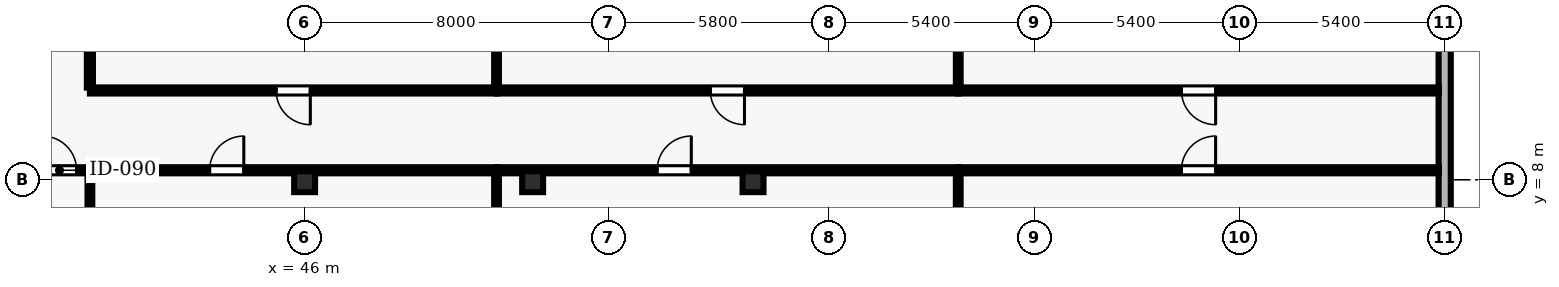
"""IFC4 building model, lengths in metres.
Left out: names, types, materials, properties, quantities, classifications, styles, units other than length and angle.
Written with IfcOpenShell. Run it as: python <this file> out.ifc"""

import sys

from ifc_helpers import new_model, si_unit, direction, frame, frame_2d, origin, origin_2d, place, context, subcontext, project, spatial, rectangle, hollow_rectangle, extrude, element, fill, save


model = new_model("IFC4")
c1 = context("Model", 3, precision=1e-05, world=origin(), true_north=direction((0.0, 1.0)))
c2 = subcontext(c1, "Body", "Model", "MODEL_VIEW")
j1 = project(units=[si_unit("LENGTHUNIT", "METRE"), si_unit("PLANEANGLEUNIT", "RADIAN")], contexts=[c1])
p1 = place(None, origin())
s1 = spatial("IfcSite", under=j1, at=p1, CompositionType="ELEMENT")
p2 = place(p1, origin())
s2 = spatial("IfcBuilding", under=s1, at=p2, CompositionType="ELEMENT")
p3 = place(p2, frame((0.0, 0.0, 81.7)))
s3 = spatial("IfcBuildingStorey", under=s2, at=p3, CompositionType="ELEMENT", Elevation=81.7)
for number, where, z_axis, x_axis in (
    (1, (46.0, 7.95, 0.0), (0.0, 0.0, 1.0), (1.0, 0.0, 0.0)),
    (2, (52.0, 7.95, 0.0), (0.0, 0.0, 1.0), (1.0, 0.0, 0.0)),
    (3, (57.8, 7.95, 0.0), (0.0, 0.0, 1.0), (1.0, 0.0, 0.0)),
):
    element("IfcColumn", number, at=place(p3, frame(where, z_axis=z_axis, x_axis=x_axis)), inside=s3, PredefinedType="COLUMN", context=c2, shape_type="SweptSolid", body=[
        extrude(hollow_rectangle(XDim=0.55, YDim=0.55, WallThickness=0.025, at=origin_2d()), origin(), (0.0, 0.0, 1.0), 3.9),
    ])
p4 = place(p3, frame((76.0, 2.5, 0.0), z_axis=(0.0, 0.0, 1.0), x_axis=(0.0, 1.0, 0.0)))
e4 = element("IfcWall", 4, at=p4, inside=s3, PredefinedType="SOLIDWALL", context=c2, shape_type="SweptSolid", body=[
    extrude(rectangle(XDim=11.0, YDim=0.32, at=frame_2d((5.5, 0.0))), origin(), (0.0, 0.0, 1.0), 3.69),
])
p5 = place(p4, frame((1.85, 0.0, 0.9)))
e5 = element("IfcOpeningElement", 5, at=p5, cuts=e4, PredefinedType="OPENING", context=c2, shape_type="SweptSolid", body=[
    extrude(rectangle(XDim=1.8, YDim=2.2, at=frame_2d((0.9, 1.1))), frame((0.0, 0.17, 0.0), z_axis=(0.0, -1.0, 0.0), x_axis=(1.0, 0.0, 0.0)), (0.0, 0.0, 1.0), 0.34),
])
p6 = place(p3, frame((38.05, 8.25, 0.0), z_axis=(0.0, 0.0, 1.0), x_axis=(1.0, 0.0, 0.0)))
e6 = element("IfcWall", 6, at=p6, inside=s3, PredefinedType="PARTITIONING", context=c2, shape_type="SweptSolid", body=[
    extrude(rectangle(XDim=2.3, YDim=0.16, at=frame_2d((1.15, 0.0))), origin(), (0.0, 0.0, 1.0), 3.055),
])
p7 = place(p6, frame((1.05, 0.0, 0.0)))
e7 = element("IfcOpeningElement", 7, at=p7, cuts=e6, PredefinedType="OPENING", context=c2, shape_type="SweptSolid", body=[
    extrude(rectangle(XDim=0.9, YDim=2.1, at=frame_2d((0.45, 1.05))), frame((0.0, 0.09, 0.0), z_axis=(0.0, -1.0, 0.0), x_axis=(1.0, 0.0, 0.0)), (0.0, 0.0, 1.0), 0.18),
])
p8 = place(p3, frame((40.35, 8.25, 0.0), z_axis=(0.0, 0.0, 1.0), x_axis=(1.0, 0.0, 0.0)))
e8 = element("IfcWall", 8, at=p8, inside=s3, PredefinedType="PARTITIONING", context=c2, shape_type="SweptSolid", body=[
    extrude(rectangle(XDim=10.7, YDim=0.16, at=frame_2d((5.35, 0.0))), origin(), (0.0, 0.0, 1.0), 3.055),
])
p9 = place(p8, frame((3.15, 0.0, 0.0)))
e9 = element("IfcOpeningElement", 9, at=p9, cuts=e8, PredefinedType="OPENING", context=c2, shape_type="SweptSolid", body=[
    extrude(rectangle(XDim=0.9, YDim=2.1, at=frame_2d((0.45, 1.05))), frame((0.0, 0.09, 0.0), z_axis=(0.0, -1.0, 0.0), x_axis=(1.0, 0.0, 0.0)), (0.0, 0.0, 1.0), 0.18),
])
p10 = place(p3, frame((51.05, 8.25, 0.0), z_axis=(0.0, 0.0, 1.0), x_axis=(1.0, 0.0, 0.0)))
e10 = element("IfcWall", 10, at=p10, inside=s3, PredefinedType="PARTITIONING", context=c2, shape_type="SweptSolid", body=[
    extrude(rectangle(XDim=12.15, YDim=0.16, at=frame_2d((6.075, 0.0))), origin(), (0.0, 0.0, 1.0), 3.055),
])
p11 = place(p10, frame((4.225, 0.0, 0.0)))
e11 = element("IfcOpeningElement", 11, at=p11, cuts=e10, PredefinedType="OPENING", context=c2, shape_type="SweptSolid", body=[
    extrude(rectangle(XDim=0.9, YDim=2.1, at=frame_2d((0.45, 1.05))), frame((0.0, 0.09, 0.0), z_axis=(0.0, -1.0, 0.0), x_axis=(1.0, 0.0, 0.0)), (0.0, 0.0, 1.0), 0.18),
])
p12 = place(p3, frame((51.05, 10.35, 0.0), z_axis=(0.0, 0.0, 1.0), x_axis=(-1.0, 0.0, 0.0)))
e12 = element("IfcWall", 12, at=p12, inside=s3, PredefinedType="PARTITIONING", context=c2, shape_type="SweptSolid", body=[
    extrude(rectangle(XDim=10.7, YDim=0.16, at=frame_2d((5.35, 0.0))), origin(), (0.0, 0.0, 1.0), 3.277),
])
p13 = place(p12, frame((4.9, 0.0, 0.0)))
e13 = element("IfcOpeningElement", 13, at=p13, cuts=e12, PredefinedType="OPENING", context=c2, shape_type="SweptSolid", body=[
    extrude(rectangle(XDim=0.9, YDim=2.1, at=frame_2d((0.45, 1.05))), frame((0.0, 0.09, 0.0), z_axis=(0.0, -1.0, 0.0), x_axis=(1.0, 0.0, 0.0)), (0.0, 0.0, 1.0), 0.18),
])
p14 = place(p3, frame((63.2, 8.25, 0.0), z_axis=(0.0, 0.0, 1.0), x_axis=(1.0, 0.0, 0.0)))
e14 = element("IfcWall", 14, at=p14, inside=s3, PredefinedType="PARTITIONING", context=c2, shape_type="SweptSolid", body=[
    extrude(rectangle(XDim=12.645, YDim=0.16, at=frame_2d((6.323, 0.0))), origin(), (0.0, 0.0, 1.0), 3.69),
])
p15 = place(p14, frame((5.872, 0.0, 0.0)))
e15 = element("IfcOpeningElement", 15, at=p15, cuts=e14, PredefinedType="OPENING", context=c2, shape_type="SweptSolid", body=[
    extrude(rectangle(XDim=0.9, YDim=2.1, at=frame_2d((0.45, 1.05))), frame((0.0, 0.09, 0.0), z_axis=(0.0, -1.0, 0.0), x_axis=(1.0, 0.0, 0.0)), (0.0, 0.0, 1.0), 0.18),
])
p16 = place(p3, frame((63.2, 10.35, 0.0), z_axis=(0.0, 0.0, 1.0), x_axis=(-1.0, 0.0, 0.0)))
e16 = element("IfcWall", 16, at=p16, inside=s3, PredefinedType="PARTITIONING", context=c2, shape_type="SweptSolid", body=[
    extrude(rectangle(XDim=12.15, YDim=0.16, at=frame_2d((6.075, 0.0))), origin(), (0.0, 0.0, 1.0), 3.277),
])
p17 = place(p16, frame((5.625, 0.0, 0.0)))
e17 = element("IfcOpeningElement", 17, at=p17, cuts=e16, PredefinedType="OPENING", context=c2, shape_type="SweptSolid", body=[
    extrude(rectangle(XDim=0.9, YDim=2.1, at=frame_2d((0.45, 1.05))), frame((0.0, 0.09, 0.0), z_axis=(0.0, -1.0, 0.0), x_axis=(1.0, 0.0, 0.0)), (0.0, 0.0, 1.0), 0.18),
])
p18 = place(p3, frame((75.845, 10.35, 0.0), z_axis=(0.0, 0.0, 1.0), x_axis=(-1.0, 0.0, 0.0)))
e18 = element("IfcWall", 18, at=p18, inside=s3, PredefinedType="PARTITIONING", context=c2, shape_type="SweptSolid", body=[
    extrude(rectangle(XDim=12.645, YDim=0.16, at=frame_2d((6.323, 0.0))), origin(), (0.0, 0.0, 1.0), 3.277),
])
p19 = place(p18, frame((5.872, 0.0, 0.0)))
e19 = element("IfcOpeningElement", 19, at=p19, cuts=e18, PredefinedType="OPENING", context=c2, shape_type="SweptSolid", body=[
    extrude(rectangle(XDim=0.9, YDim=2.1, at=frame_2d((0.45, 1.05))), frame((0.0, 0.09, 0.0), z_axis=(0.0, -1.0, 0.0), x_axis=(1.0, 0.0, 0.0)), (0.0, 0.0, 1.0), 0.18),
])
p20 = place(p3, frame((40.35, 0.155, 0.0), z_axis=(0.0, 0.0, 1.0), x_axis=(0.0, 1.0, 0.0)))
e20 = element("IfcWall", 20, at=p20, inside=s3, PredefinedType="PARTITIONING", context=c2, shape_type="SweptSolid", body=[
    extrude(rectangle(XDim=8.02, YDim=0.125, at=frame_2d((4.01, 0.0))), origin(), (0.0, 0.0, 1.0), 3.69),
])
p21 = place(p3, frame((40.35, 10.425, 0.0), z_axis=(0.0, 0.0, 1.0), x_axis=(0.0, 1.0, 0.0)))
e21 = element("IfcWall", 21, at=p21, inside=s3, PredefinedType="PARTITIONING", context=c2, shape_type="SweptSolid", body=[
    extrude(rectangle(XDim=5.5, YDim=0.16, at=frame_2d((2.75, 0.0))), origin(), (0.0, 0.0, 1.0), 3.277),
])
p22 = place(p3, frame((51.05, 0.155, 0.0), z_axis=(0.0, 0.0, 1.0), x_axis=(0.0, 1.0, 0.0)))
e22 = element("IfcWall", 22, at=p22, inside=s3, PredefinedType="PARTITIONING", context=c2, shape_type="SweptSolid", body=[
    extrude(rectangle(XDim=8.02, YDim=0.125, at=frame_2d((4.01, 0.0))), origin(), (0.0, 0.0, 1.0), 3.69),
])
p23 = place(p3, frame((51.05, 10.425, 0.0), z_axis=(0.0, 0.0, 1.0), x_axis=(0.0, 1.0, 0.0)))
e23 = element("IfcWall", 23, at=p23, inside=s3, PredefinedType="PARTITIONING", context=c2, shape_type="SweptSolid", body=[
    extrude(rectangle(XDim=5.42, YDim=0.125, at=frame_2d((2.71, 0.0))), origin(), (0.0, 0.0, 1.0), 3.69),
])
p24 = place(p3, frame((63.2, 0.155, 0.0), z_axis=(0.0, 0.0, 1.0), x_axis=(0.0, 1.0, 0.0)))
e24 = element("IfcWall", 24, at=p24, inside=s3, PredefinedType="PARTITIONING", context=c2, shape_type="SweptSolid", body=[
    extrude(rectangle(XDim=8.02, YDim=0.125, at=frame_2d((4.01, 0.0))), origin(), (0.0, 0.0, 1.0), 3.055),
])
p25 = place(p3, frame((63.2, 10.425, 0.0), z_axis=(0.0, 0.0, 1.0), x_axis=(0.0, 1.0, 0.0)))
e25 = element("IfcWall", 25, at=p25, inside=s3, PredefinedType="PARTITIONING", context=c2, shape_type="SweptSolid", body=[
    extrude(rectangle(XDim=5.42, YDim=0.125, at=frame_2d((2.71, 0.0))), origin(), (0.0, 0.0, 1.0), 3.055),
])
p26 = place(p7, origin())
e26 = element("IfcDoor", 26, at=p26, inside=s3, OperationType="SINGLE_SWING_LEFT", PredefinedType="DOOR", context=c2, shape_type="SweptSolid", body=[
    extrude(rectangle(XDim=0.9, YDim=2.1, at=frame_2d((0.45, 1.05))), frame((0.0, 0.025, 0.0), z_axis=(0.0, -1.0, 0.0), x_axis=(1.0, 0.0, 0.0)), (0.0, 0.0, 1.0), 0.05),
])
fill(e7, e26)
p27 = place(p9, origin())
e27 = element("IfcDoor", 27, at=p27, inside=s3, OperationType="SINGLE_SWING_RIGHT", PredefinedType="DOOR", context=c2, shape_type="SweptSolid", body=[
    extrude(rectangle(XDim=0.9, YDim=2.1, at=frame_2d((0.45, 1.05))), frame((0.0, 0.025, 0.0), z_axis=(0.0, -1.0, 0.0), x_axis=(1.0, 0.0, 0.0)), (0.0, 0.0, 1.0), 0.05),
])
fill(e9, e27)
p28 = place(p13, origin())
e28 = element("IfcDoor", 28, at=p28, inside=s3, OperationType="SINGLE_SWING_LEFT", PredefinedType="DOOR", context=c2, shape_type="SweptSolid", body=[
    extrude(rectangle(XDim=0.9, YDim=2.1, at=frame_2d((0.45, 1.05))), frame((0.0, 0.025, 0.0), z_axis=(0.0, -1.0, 0.0), x_axis=(1.0, 0.0, 0.0)), (0.0, 0.0, 1.0), 0.05),
])
fill(e13, e28)
p29 = place(p11, origin())
e29 = element("IfcDoor", 29, at=p29, inside=s3, OperationType="SINGLE_SWING_RIGHT", PredefinedType="DOOR", context=c2, shape_type="SweptSolid", body=[
    extrude(rectangle(XDim=0.9, YDim=2.1, at=frame_2d((0.45, 1.05))), frame((0.0, 0.025, 0.0), z_axis=(0.0, -1.0, 0.0), x_axis=(1.0, 0.0, 0.0)), (0.0, 0.0, 1.0), 0.05),
])
fill(e11, e29)
p30 = place(p17, origin())
e30 = element("IfcDoor", 30, at=p30, inside=s3, OperationType="SINGLE_SWING_LEFT", PredefinedType="DOOR", context=c2, shape_type="SweptSolid", body=[
    extrude(rectangle(XDim=0.9, YDim=2.1, at=frame_2d((0.45, 1.05))), frame((0.0, 0.025, 0.0), z_axis=(0.0, -1.0, 0.0), x_axis=(1.0, 0.0, 0.0)), (0.0, 0.0, 1.0), 0.05),
])
fill(e17, e30)
p31 = place(p15, origin())
e31 = element("IfcDoor", 31, at=p31, inside=s3, OperationType="SINGLE_SWING_RIGHT", PredefinedType="DOOR", context=c2, shape_type="SweptSolid", body=[
    extrude(rectangle(XDim=0.9, YDim=2.1, at=frame_2d((0.45, 1.05))), frame((0.0, 0.025, 0.0), z_axis=(0.0, -1.0, 0.0), x_axis=(1.0, 0.0, 0.0)), (0.0, 0.0, 1.0), 0.05),
])
fill(e15, e31)
p32 = place(p19, origin())
e32 = element("IfcDoor", 32, at=p32, inside=s3, OperationType="SINGLE_SWING_LEFT", PredefinedType="DOOR", context=c2, shape_type="SweptSolid", body=[
    extrude(rectangle(XDim=0.9, YDim=2.1, at=frame_2d((0.45, 1.05))), frame((0.0, 0.025, 0.0), z_axis=(0.0, -1.0, 0.0), x_axis=(1.0, 0.0, 0.0)), (0.0, 0.0, 1.0), 0.05),
])
fill(e19, e32)
save(model, sys.argv[1])
